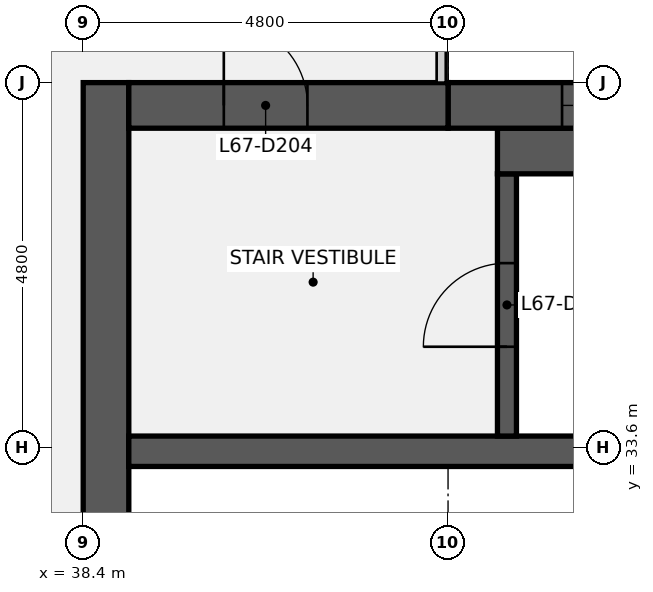
"""IFC4 building model, lengths in metres.
Left out: names, types, materials, properties, quantities, classifications, styles, units other than length and angle.
Written with IfcOpenShell. Run it as: python <this file> out.ifc"""

import sys

from ifc_helpers import new_model, si_unit, direction, frame, frame_2d, origin, place, context, subcontext, project, spatial, rectangle, extrude, element, fill, save


model = new_model("IFC4")
c1 = context("Model", 3, precision=1e-05, world=origin(), true_north=direction((0.0, 1.0)))
c2 = subcontext(c1, "Body", "Model", "MODEL_VIEW")
j1 = project(units=[si_unit("LENGTHUNIT", "METRE"), si_unit("PLANEANGLEUNIT", "RADIAN")], contexts=[c1])
p1 = place(None, origin())
s1 = spatial("IfcSite", under=j1, at=p1, CompositionType="ELEMENT")
p2 = place(p1, origin())
s2 = spatial("IfcBuilding", under=s1, at=p2, CompositionType="ELEMENT")
p3 = place(p2, frame((0.0, 0.0, 306.3)))
s3 = spatial("IfcBuildingStorey", under=s2, at=p3, CompositionType="ELEMENT", Elevation=306.3)
p4 = place(p3, frame((38.7, 9.6, 0.0), z_axis=(0.0, 0.0, 1.0), x_axis=(0.0, 1.0, 0.0)))
e1 = element("IfcWall", 1, at=p4, inside=s3, PredefinedType="SHEAR", context=c2, shape_type="SweptSolid", body=[
    extrude(rectangle(XDim=28.8, YDim=0.6, at=frame_2d((14.4, 0.0))), origin(), (0.0, 0.0, 1.0), 3.84),
])
p5 = place(p4, frame((8.7, 0.0, 0.0)))
e2 = element("IfcOpeningElement", 2, at=p5, cuts=e1, PredefinedType="OPENING", context=c2, shape_type="SweptSolid", body=[
    extrude(rectangle(XDim=1.8, YDim=2.1, at=frame_2d((0.9, 1.05))), frame((0.0, 0.31, 0.0), z_axis=(0.0, -1.0, 0.0), x_axis=(1.0, 0.0, 0.0)), (0.0, 0.0, 1.0), 0.62),
])
p6 = place(p4, frame((18.3, 0.0, 0.0)))
e3 = element("IfcOpeningElement", 3, at=p6, cuts=e1, PredefinedType="OPENING", context=c2, shape_type="SweptSolid", body=[
    extrude(rectangle(XDim=1.8, YDim=2.1, at=frame_2d((0.9, 1.05))), frame((0.0, 0.31, 0.0), z_axis=(0.0, -1.0, 0.0), x_axis=(1.0, 0.0, 0.0)), (0.0, 0.0, 1.0), 0.62),
])
p7 = place(p3, frame((39.0, 33.55, 0.0), z_axis=(0.0, 0.0, 1.0), x_axis=(1.0, 0.0, 0.0)))
e4 = element("IfcWall", 4, at=p7, inside=s3, PredefinedType="SHEAR", context=c2, shape_type="SweptSolid", body=[
    extrude(rectangle(XDim=18.0, YDim=0.4, at=frame_2d((9.0, 0.0))), origin(), (0.0, 0.0, 1.0), 3.84),
])
p8 = place(p3, frame((43.975, 33.75, 0.0), z_axis=(0.0, 0.0, 1.0), x_axis=(0.0, 1.0, 0.0)))
e5 = element("IfcWall", 5, at=p8, inside=s3, PredefinedType="SHEAR", context=c2, shape_type="SweptSolid", body=[
    extrude(rectangle(XDim=3.45, YDim=0.25, at=frame_2d((1.725, 0.0))), origin(), (0.0, 0.0, 1.0), 3.84),
])
p9 = place(p8, frame((1.175, 0.0, 0.0)))
e6 = element("IfcOpeningElement", 6, at=p9, cuts=e5, PredefinedType="OPENING", context=c2, shape_type="SweptSolid", body=[
    extrude(rectangle(XDim=1.1, YDim=2.1, at=frame_2d((0.55, 1.05))), frame((0.0, 0.135, 0.0), z_axis=(0.0, -1.0, 0.0), x_axis=(1.0, 0.0, 0.0)), (0.0, 0.0, 1.0), 0.27),
])
p10 = place(p3, frame((43.85, 37.5, 0.0), z_axis=(0.0, 0.0, 1.0), x_axis=(1.0, 0.0, 0.0)))
e7 = element("IfcWall", 7, at=p10, inside=s3, PredefinedType="SHEAR", context=c2, shape_type="SweptSolid", body=[
    extrude(rectangle(XDim=7.5, YDim=0.6, at=frame_2d((3.75, 0.0))), origin(), (0.0, 0.0, 1.0), 3.84),
])
p11 = place(p3, frame((43.2, 38.1, 0.0), z_axis=(0.0, 0.0, 1.0), x_axis=(1.0, 0.0, 0.0)))
e8 = element("IfcWall", 8, at=p11, inside=s3, PredefinedType="SHEAR", context=c2, shape_type="SweptSolid", body=[
    extrude(rectangle(XDim=13.8, YDim=0.6, at=frame_2d((6.9, 0.0))), origin(), (0.0, 0.0, 1.0), 3.84),
])
p12 = place(p11, frame((6.3, 0.0, 0.9)))
e9 = element("IfcOpeningElement", 9, at=p12, cuts=e8, PredefinedType="OPENING", context=c2, shape_type="SweptSolid", body=[
    extrude(rectangle(XDim=1.8, YDim=1.5, at=frame_2d((0.9, 0.75))), frame((0.0, 0.31, 0.0), z_axis=(0.0, -1.0, 0.0), x_axis=(1.0, 0.0, 0.0)), (0.0, 0.0, 1.0), 0.62),
])
p13 = place(p11, frame((1.5, 0.0, 0.9)))
e10 = element("IfcOpeningElement", 10, at=p13, cuts=e8, PredefinedType="OPENING", context=c2, shape_type="SweptSolid", body=[
    extrude(rectangle(XDim=1.8, YDim=1.5, at=frame_2d((0.9, 0.75))), frame((0.0, 0.31, 0.0), z_axis=(0.0, -1.0, 0.0), x_axis=(1.0, 0.0, 0.0)), (0.0, 0.0, 1.0), 0.62),
])
p14 = place(p3, frame((39.0, 38.1, 0.0), z_axis=(0.0, 0.0, 1.0), x_axis=(1.0, 0.0, 0.0)))
e11 = element("IfcWall", 11, at=p14, inside=s3, PredefinedType="SHEAR", context=c2, shape_type="SweptSolid", body=[
    extrude(rectangle(XDim=4.2, YDim=0.6, at=frame_2d((2.1, 0.0))), origin(), (0.0, 0.0, 1.0), 3.84),
])
p15 = place(p14, frame((1.25, 0.0, 0.0)))
e12 = element("IfcOpeningElement", 12, at=p15, cuts=e11, PredefinedType="OPENING", context=c2, shape_type="SweptSolid", body=[
    extrude(rectangle(XDim=1.1, YDim=2.1, at=frame_2d((0.55, 1.05))), frame((0.0, 0.31, 0.0), z_axis=(0.0, -1.0, 0.0), x_axis=(1.0, 0.0, 0.0)), (0.0, 0.0, 1.0), 0.62),
])
p16 = place(p9, origin())
e13 = element("IfcDoor", 13, at=p16, inside=s3, OperationType="SINGLE_SWING_LEFT", PredefinedType="DOOR", context=c2, shape_type="SweptSolid", body=[
    extrude(rectangle(XDim=1.1, YDim=2.1, at=frame_2d((0.55, 1.05))), frame((0.0, 0.025, 0.0), z_axis=(0.0, -1.0, 0.0), x_axis=(1.0, 0.0, 0.0)), (0.0, 0.0, 1.0), 0.05),
])
fill(e6, e13)
p17 = place(p15, origin())
e14 = element("IfcDoor", 14, at=p17, inside=s3, OperationType="SINGLE_SWING_LEFT", PredefinedType="DOOR", context=c2, shape_type="SweptSolid", body=[
    extrude(rectangle(XDim=1.1, YDim=2.1, at=frame_2d((0.55, 1.05))), frame((0.0, 0.025, 0.0), z_axis=(0.0, -1.0, 0.0), x_axis=(1.0, 0.0, 0.0)), (0.0, 0.0, 1.0), 0.05),
])
fill(e12, e14)
p18 = place(p13, origin())
e15 = element("IfcWindow", 15, at=p18, inside=s3, PartitioningType="SINGLE_PANEL", PredefinedType="WINDOW", context=c2, shape_type="SweptSolid", body=[
    extrude(rectangle(XDim=1.8, YDim=1.5, at=frame_2d((0.9, 0.75))), frame((0.0, 0.03, 0.0), z_axis=(0.0, -1.0, 0.0), x_axis=(1.0, 0.0, 0.0)), (0.0, 0.0, 1.0), 0.06),
])
fill(e10, e15)
save(model, sys.argv[1])
